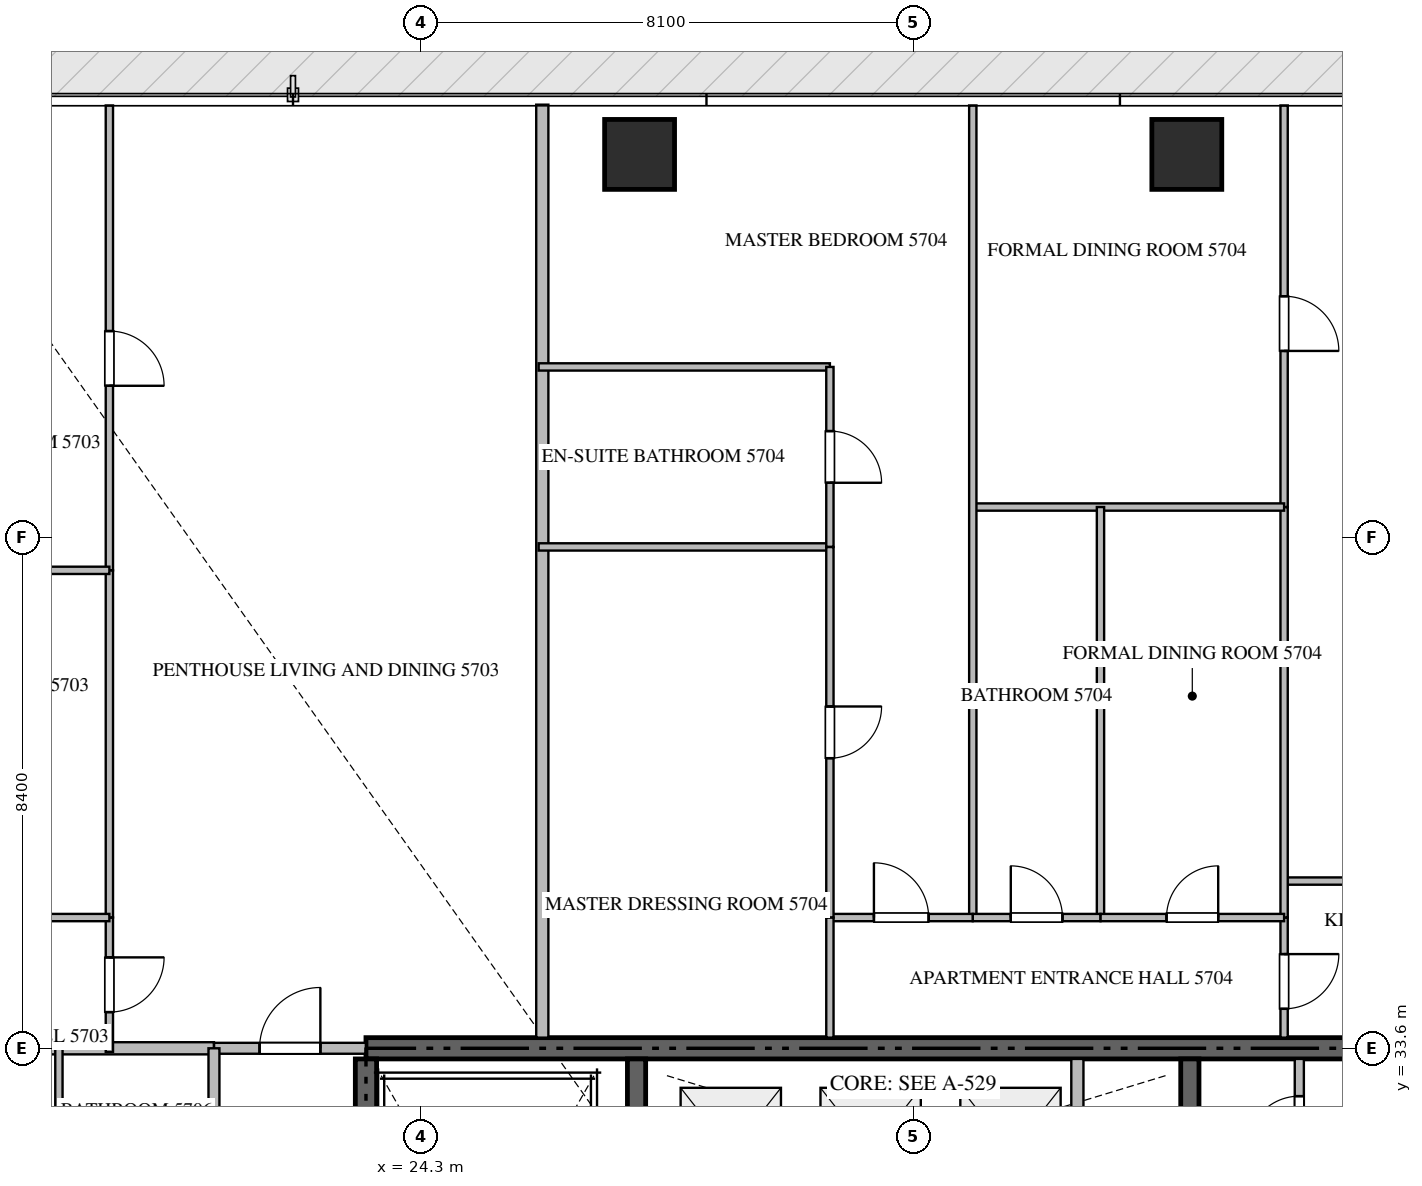
"""IFC4 building model, lengths in metres.
Left out: names, types, materials, properties, quantities, classifications, styles, units other than length and angle.
Written with IfcOpenShell. Run it as: python <this file> out.ifc"""

import sys

from ifc_helpers import new_model, si_unit, direction, frame, frame_2d, origin, origin_2d, place, context, subcontext, project, spatial, rectangle, extrude, source, transform, mapped, element, fill, save


model = new_model("IFC4")
c1 = context("Model", 3, precision=1e-05, world=origin(), true_north=direction((0.0, 1.0)))
c2 = subcontext(c1, "Body", "Model", "MODEL_VIEW")
j1 = project(units=[si_unit("LENGTHUNIT", "METRE"), si_unit("PLANEANGLEUNIT", "RADIAN")], contexts=[c1])
p1 = place(None, origin())
s1 = spatial("IfcSite", under=j1, at=p1, CompositionType="ELEMENT")
p2 = place(p1, origin())
s2 = spatial("IfcBuilding", under=s1, at=p2, CompositionType="ELEMENT")
p3 = place(p2, frame((0.0, 0.0, 229.7)))
s3 = spatial("IfcBuildingStorey", under=s2, at=p3, CompositionType="ELEMENT", Elevation=229.7)
p4 = place(p3, frame((41.4, 33.6, -0.26), z_axis=(0.0, 0.0, 1.0), x_axis=(-1.0, 0.0, 0.0)))
e1 = element("IfcWall", 1, at=p4, inside=s3, PredefinedType="SHEAR", context=c2, shape_type="SweptSolid", body=[
    extrude(rectangle(XDim=18.0, YDim=0.35, at=frame_2d((9.0, 0.0))), origin(), (0.0, 0.0, 1.0), 3.848),
])
p5 = place(p3, frame((23.4, 24.25, -0.26), z_axis=(0.0, 0.0, 1.0), x_axis=(0.0, 1.0, 0.0)))
e2 = element("IfcWall", 2, at=p5, inside=s3, PredefinedType="SHEAR", context=c2, shape_type="SweptSolid", body=[
    extrude(rectangle(XDim=9.175, YDim=0.35, at=frame_2d((4.587, 0.0))), origin(), (0.0, 0.0, 1.0), 3.848),
])
p6 = place(p3, frame((27.85, 23.55, -0.26), z_axis=(0.0, 0.0, 1.0), x_axis=(0.0, 1.0, 0.0)))
e3 = element("IfcWall", 3, at=p6, inside=s3, PredefinedType="SHEAR", context=c2, shape_type="SweptSolid", body=[
    extrude(rectangle(XDim=9.875, YDim=0.3, at=frame_2d((4.938, 0.0))), origin(), (0.0, 0.0, 1.0), 3.848),
])
p7 = place(p3, frame((36.95, 27.05, -0.26), z_axis=(0.0, 0.0, 1.0), x_axis=(0.0, 1.0, 0.0)))
e4 = element("IfcWall", 4, at=p7, inside=s3, PredefinedType="SHEAR", context=c2, shape_type="SweptSolid", body=[
    extrude(rectangle(XDim=6.375, YDim=0.3, at=frame_2d((3.188, 0.0))), origin(), (0.0, 0.0, 1.0), 3.848),
])
m1 = source(origin(), c2, "Body", "SweptSolid", [
    extrude(rectangle(XDim=1.15, YDim=1.15, at=origin_2d()), origin(), (0.0, 0.0, 1.0), 3.85),
])
for number, where, z_axis, x_axis in (
    (5, (27.9, 48.3, -0.26), (0.0, 0.0, 1.0), (1.0, 0.0, 0.0)),
    (6, (36.9, 48.3, -0.26), (0.0, 0.0, 1.0), (1.0, 0.0, 0.0)),
):
    element("IfcColumn", number, at=place(p3, frame(where, z_axis=z_axis, x_axis=x_axis)), inside=s3, PredefinedType="COLUMN", context=c2, shape_type="MappedRepresentation", body=[
        mapped(m1, transform((0.0, 0.0, 0.0), scale=1.0)),
    ])
p8 = place(p3, frame((35.1, 30.75, 0.0), z_axis=(0.0, 0.0, 1.0), x_axis=(0.0, 1.0, 0.0)))
e7 = element("IfcWall", 7, at=p8, inside=s3, PredefinedType="STANDARD", context=c2, shape_type="SweptSolid", body=[
    extrude(rectangle(XDim=2.675, YDim=0.2, at=frame_2d((1.337, 0.0))), origin(), (0.0, 0.0, 1.0), 3.59),
])
p9 = place(p3, frame((38.75, 31.352, 0.0), z_axis=(0.0, 0.0, 1.0), x_axis=(0.0, 1.0, 0.0)))
e8 = element("IfcWall", 8, at=p9, inside=s3, PredefinedType="PARTITIONING", context=c2, shape_type="SweptSolid", body=[
    extrude(rectangle(XDim=2.073, YDim=0.15, at=frame_2d((1.037, 0.0))), origin(), (0.0, 0.0, 1.0), 3.59),
])
p10 = place(p9, frame((0.611, 0.0, 0.0)))
e9 = element("IfcOpeningElement", 9, at=p10, cuts=e8, PredefinedType="OPENING", context=c2, shape_type="SweptSolid", body=[
    extrude(rectangle(XDim=0.85, YDim=2.1, at=frame_2d((0.425, 1.05))), frame((0.0, 0.085, 0.0), z_axis=(0.0, -1.0, 0.0), x_axis=(1.0, 0.0, 0.0)), (0.0, 0.0, 1.0), 0.17),
])
p11 = place(p3, frame((26.3, 33.775, 0.0), z_axis=(0.0, 0.0, 1.0), x_axis=(0.0, 1.0, 0.0)))
e10 = element("IfcWall", 10, at=p11, inside=s3, PredefinedType="PARTITIONING", context=c2, shape_type="SweptSolid", body=[
    extrude(rectangle(XDim=15.343, YDim=0.2, at=frame_2d((7.671, 0.0))), origin(), (0.0, 0.0, 1.0), 3.59),
])
p12 = place(p3, frame((7.482, 33.6, 0.0), z_axis=(0.0, 0.0, 1.0), x_axis=(1.0, 0.0, 0.0)))
e11 = element("IfcWall", 11, at=p12, inside=s3, PredefinedType="PARTITIONING", context=c2, shape_type="SweptSolid", body=[
    extrude(rectangle(XDim=13.418, YDim=0.2, at=frame_2d((6.709, 0.0))), origin(), (0.0, 0.0, 1.0), 3.59),
])
p13 = place(p3, frame((20.902, 33.6, 0.0), z_axis=(0.0, 0.0, 1.0), x_axis=(1.0, 0.0, 0.0)))
e12 = element("IfcWall", 12, at=p13, inside=s3, PredefinedType="PARTITIONING", context=c2, shape_type="SweptSolid", body=[
    extrude(rectangle(XDim=2.496, YDim=0.18, at=frame_2d((1.248, 0.0))), origin(), (0.0, 0.0, 1.0), 3.59),
])
p14 = place(p13, frame((0.748, 0.0, 0.0)))
e13 = element("IfcOpeningElement", 13, at=p14, cuts=e12, PredefinedType="OPENING", context=c2, shape_type="SweptSolid", body=[
    extrude(rectangle(XDim=1.0, YDim=2.15, at=frame_2d((0.5, 1.075))), frame((0.0, 0.1, 0.0), z_axis=(0.0, -1.0, 0.0), x_axis=(1.0, 0.0, 0.0)), (0.0, 0.0, 1.0), 0.2),
])
p15 = place(p3, frame((20.9, 16.8, 0.0), z_axis=(0.0, 0.0, 1.0), x_axis=(0.0, 1.0, 0.0)))
e14 = element("IfcWall", 14, at=p15, inside=s3, PredefinedType="PARTITIONING", context=c2, shape_type="SweptSolid", body=[
    extrude(rectangle(XDim=16.8, YDim=0.18, at=frame_2d((8.4, 0.0))), origin(), (0.0, 0.0, 1.0), 3.59),
])
p16 = place(p15, frame((2.465, 0.0, 0.0)))
e15 = element("IfcOpeningElement", 15, at=p16, cuts=e14, PredefinedType="OPENING", context=c2, shape_type="SweptSolid", body=[
    extrude(rectangle(XDim=1.0, YDim=2.15, at=frame_2d((0.5, 1.075))), frame((0.0, 0.1, 0.0), z_axis=(0.0, -1.0, 0.0), x_axis=(1.0, 0.0, 0.0)), (0.0, 0.0, 1.0), 0.2),
])
p17 = place(p15, frame((10.902, 0.0, 0.0)))
e16 = element("IfcOpeningElement", 16, at=p17, cuts=e14, PredefinedType="OPENING", context=c2, shape_type="SweptSolid", body=[
    extrude(rectangle(XDim=1.0, YDim=2.15, at=frame_2d((0.5, 1.075))), frame((0.0, 0.1, 0.0), z_axis=(0.0, -1.0, 0.0), x_axis=(1.0, 0.0, 0.0)), (0.0, 0.0, 1.0), 0.2),
])
p18 = place(p3, frame((19.18, 35.75, 0.0), z_axis=(0.0, 0.0, 1.0), x_axis=(0.0, -1.0, 0.0)))
e17 = element("IfcWall", 17, at=p18, inside=s3, PredefinedType="PARTITIONING", context=c2, shape_type="SweptSolid", body=[
    extrude(rectangle(XDim=2.21, YDim=0.12, at=frame_2d((1.105, 0.0))), origin(), (0.0, 0.0, 1.0), 3.59),
])
p19 = place(p18, frame((0.655, 0.0, 0.0)))
e18 = element("IfcOpeningElement", 18, at=p19, cuts=e17, PredefinedType="OPENING", context=c2, shape_type="SweptSolid", body=[
    extrude(rectangle(XDim=0.9, YDim=2.1, at=frame_2d((0.45, 1.05))), frame((0.0, 0.07, 0.0), z_axis=(0.0, -1.0, 0.0), x_axis=(1.0, 0.0, 0.0)), (0.0, 0.0, 1.0), 0.14),
])
p20 = place(p3, frame((19.18, 49.105, 0.0), z_axis=(0.0, 0.0, 1.0), x_axis=(0.0, -1.0, 0.0)))
e19 = element("IfcWall", 19, at=p20, inside=s3, PredefinedType="PARTITIONING", context=c2, shape_type="SweptSolid", body=[
    extrude(rectangle(XDim=7.645, YDim=0.12, at=frame_2d((3.823, 0.0))), origin(), (0.0, 0.0, 1.0), 3.59),
])
p21 = place(p20, frame((3.71, 0.0, 0.0)))
e20 = element("IfcOpeningElement", 20, at=p21, cuts=e19, PredefinedType="OPENING", context=c2, shape_type="SweptSolid", body=[
    extrude(rectangle(XDim=0.9, YDim=2.1, at=frame_2d((0.45, 1.05))), frame((0.0, 0.07, 0.0), z_axis=(0.0, -1.0, 0.0), x_axis=(1.0, 0.0, 0.0)), (0.0, 0.0, 1.0), 0.14),
])
p22 = place(p3, frame((19.18, 41.458, 0.0), z_axis=(0.0, 0.0, 1.0), x_axis=(0.0, -1.0, 0.0)))
e21 = element("IfcWall", 21, at=p22, inside=s3, PredefinedType="PARTITIONING", context=c2, shape_type="SweptSolid", body=[
    extrude(rectangle(XDim=5.706, YDim=0.12, at=frame_2d((2.853, 0.0))), origin(), (0.0, 0.0, 1.0), 3.59),
])
p23 = place(p3, frame((14.3, 41.46, 0.0), z_axis=(0.0, 0.0, 1.0), x_axis=(1.0, 0.0, 0.0)))
e22 = element("IfcWall", 22, at=p23, inside=s3, PredefinedType="PARTITIONING", context=c2, shape_type="SweptSolid", body=[
    extrude(rectangle(XDim=4.88, YDim=0.12, at=frame_2d((2.44, 0.0))), origin(), (0.0, 0.0, 1.0), 3.59),
])
p24 = place(p3, frame((16.402, 35.75, 0.0), z_axis=(0.0, 0.0, 1.0), x_axis=(1.0, 0.0, 0.0)))
e23 = element("IfcWall", 23, at=p24, inside=s3, PredefinedType="PARTITIONING", context=c2, shape_type="SweptSolid", body=[
    extrude(rectangle(XDim=2.778, YDim=0.12, at=frame_2d((1.389, 0.0))), origin(), (0.0, 0.0, 1.0), 3.59),
])
p25 = place(p24, frame((0.964, 0.0, 0.0)))
e24 = element("IfcOpeningElement", 24, at=p25, cuts=e23, PredefinedType="OPENING", context=c2, shape_type="SweptSolid", body=[
    extrude(rectangle(XDim=0.85, YDim=2.1, at=frame_2d((0.425, 1.05))), frame((0.0, 0.07, 0.0), z_axis=(0.0, -1.0, 0.0), x_axis=(1.0, 0.0, 0.0)), (0.0, 0.0, 1.0), 0.14),
])
p26 = place(p3, frame((38.5, 36.35, 0.0), z_axis=(0.0, 0.0, 1.0), x_axis=(1.0, 0.0, 0.0)))
e25 = element("IfcWall", 25, at=p26, inside=s3, PredefinedType="PARTITIONING", context=c2, shape_type="SweptSolid", body=[
    extrude(rectangle(XDim=2.85, YDim=0.12, at=frame_2d((1.425, 0.0))), origin(), (0.0, 0.0, 1.0), 3.59),
])
p27 = place(p26, frame((1.0, 0.0, 0.0)))
e26 = element("IfcOpeningElement", 26, at=p27, cuts=e25, PredefinedType="OPENING", context=c2, shape_type="SweptSolid", body=[
    extrude(rectangle(XDim=0.85, YDim=2.1, at=frame_2d((0.425, 1.05))), frame((0.0, 0.07, 0.0), z_axis=(0.0, -1.0, 0.0), x_axis=(1.0, 0.0, 0.0)), (0.0, 0.0, 1.0), 0.14),
])
p28 = place(p3, frame((38.5, 35.75, 0.0), z_axis=(0.0, 0.0, 1.0), x_axis=(0.0, -1.0, 0.0)))
e27 = element("IfcWall", 27, at=p28, inside=s3, PredefinedType="PARTITIONING", context=c2, shape_type="SweptSolid", body=[
    extrude(rectangle(XDim=1.975, YDim=0.12, at=frame_2d((0.988, 0.0))), origin(), (0.0, 0.0, 1.0), 3.59),
])
p29 = place(p28, frame((0.601, 0.0, 0.0)))
e28 = element("IfcOpeningElement", 28, at=p29, cuts=e27, PredefinedType="OPENING", context=c2, shape_type="SweptSolid", body=[
    extrude(rectangle(XDim=0.9, YDim=2.1, at=frame_2d((0.45, 1.05))), frame((0.0, 0.07, 0.0), z_axis=(0.0, -1.0, 0.0), x_axis=(1.0, 0.0, 0.0)), (0.0, 0.0, 1.0), 0.14),
])
p30 = place(p3, frame((38.5, 49.105, 0.0), z_axis=(0.0, 0.0, 1.0), x_axis=(0.0, -1.0, 0.0)))
e29 = element("IfcWall", 29, at=p30, inside=s3, PredefinedType="PARTITIONING", context=c2, shape_type="SweptSolid", body=[
    extrude(rectangle(XDim=6.604, YDim=0.12, at=frame_2d((3.302, 0.0))), origin(), (0.0, 0.0, 1.0), 3.59),
])
p31 = place(p30, frame((3.137, 0.0, 0.0)))
e30 = element("IfcOpeningElement", 30, at=p31, cuts=e29, PredefinedType="OPENING", context=c2, shape_type="SweptSolid", body=[
    extrude(rectangle(XDim=0.9, YDim=2.1, at=frame_2d((0.45, 1.05))), frame((0.0, 0.07, 0.0), z_axis=(0.0, -1.0, 0.0), x_axis=(1.0, 0.0, 0.0)), (0.0, 0.0, 1.0), 0.14),
])
p32 = place(p3, frame((38.5, 42.499, 0.0), z_axis=(0.0, 0.0, 1.0), x_axis=(0.0, -1.0, 0.0)))
e31 = element("IfcWall", 31, at=p32, inside=s3, PredefinedType="PARTITIONING", context=c2, shape_type="SweptSolid", body=[
    extrude(rectangle(XDim=6.747, YDim=0.12, at=frame_2d((3.374, 0.0))), origin(), (0.0, 0.0, 1.0), 3.59),
])
p33 = place(p3, frame((33.38, 42.501, 0.0), z_axis=(0.0, 0.0, 1.0), x_axis=(1.0, 0.0, 0.0)))
e32 = element("IfcWall", 32, at=p33, inside=s3, PredefinedType="PARTITIONING", context=c2, shape_type="SweptSolid", body=[
    extrude(rectangle(XDim=5.12, YDim=0.12, at=frame_2d((2.56, 0.0))), origin(), (0.0, 0.0, 1.0), 3.59),
])
p34 = place(p3, frame((33.38, 49.105, 0.0), z_axis=(0.0, 0.0, 1.0), x_axis=(0.0, -1.0, 0.0)))
e33 = element("IfcWall", 33, at=p34, inside=s3, PredefinedType="PARTITIONING", context=c2, shape_type="SweptSolid", body=[
    extrude(rectangle(XDim=13.355, YDim=0.12, at=frame_2d((6.677, 0.0))), origin(), (0.0, 0.0, 1.0), 3.59),
])
p35 = place(p3, frame((35.48, 42.501, 0.0), z_axis=(0.0, 0.0, 1.0), x_axis=(0.0, -1.0, 0.0)))
e34 = element("IfcWall", 34, at=p35, inside=s3, PredefinedType="PARTITIONING", context=c2, shape_type="SweptSolid", body=[
    extrude(rectangle(XDim=6.751, YDim=0.12, at=frame_2d((3.375, 0.0))), origin(), (0.0, 0.0, 1.0), 3.59),
])
p36 = place(p3, frame((33.38, 35.75, 0.0), z_axis=(0.0, 0.0, 1.0), x_axis=(1.0, 0.0, 0.0)))
e35 = element("IfcWall", 35, at=p36, inside=s3, PredefinedType="PARTITIONING", context=c2, shape_type="SweptSolid", body=[
    extrude(rectangle(XDim=2.1, YDim=0.12, at=frame_2d((1.05, 0.0))), origin(), (0.0, 0.0, 1.0), 3.59),
])
p37 = place(p36, frame((0.625, 0.0, 0.0)))
e36 = element("IfcOpeningElement", 36, at=p37, cuts=e35, PredefinedType="OPENING", context=c2, shape_type="SweptSolid", body=[
    extrude(rectangle(XDim=0.85, YDim=2.1, at=frame_2d((0.425, 1.05))), frame((0.0, 0.07, 0.0), z_axis=(0.0, -1.0, 0.0), x_axis=(1.0, 0.0, 0.0)), (0.0, 0.0, 1.0), 0.14),
])
p38 = place(p3, frame((35.482, 35.75, 0.0), z_axis=(0.0, 0.0, 1.0), x_axis=(1.0, 0.0, 0.0)))
e37 = element("IfcWall", 37, at=p38, inside=s3, PredefinedType="PARTITIONING", context=c2, shape_type="SweptSolid", body=[
    extrude(rectangle(XDim=3.018, YDim=0.12, at=frame_2d((1.509, 0.0))), origin(), (0.0, 0.0, 1.0), 3.59),
])
p39 = place(p38, frame((1.084, 0.0, 0.0)))
e38 = element("IfcOpeningElement", 38, at=p39, cuts=e37, PredefinedType="OPENING", context=c2, shape_type="SweptSolid", body=[
    extrude(rectangle(XDim=0.85, YDim=2.1, at=frame_2d((0.425, 1.05))), frame((0.0, 0.07, 0.0), z_axis=(0.0, -1.0, 0.0), x_axis=(1.0, 0.0, 0.0)), (0.0, 0.0, 1.0), 0.14),
])
p40 = place(p3, frame((31.03, 35.75, 0.0), z_axis=(0.0, 0.0, 1.0), x_axis=(1.0, 0.0, 0.0)))
e39 = element("IfcWall", 39, at=p40, inside=s3, PredefinedType="PARTITIONING", context=c2, shape_type="SweptSolid", body=[
    extrude(rectangle(XDim=2.348, YDim=0.12, at=frame_2d((1.174, 0.0))), origin(), (0.0, 0.0, 1.0), 3.59),
])
p41 = place(p40, frame((0.724, 0.0, 0.0)))
e40 = element("IfcOpeningElement", 40, at=p41, cuts=e39, PredefinedType="OPENING", context=c2, shape_type="SweptSolid", body=[
    extrude(rectangle(XDim=0.9, YDim=2.1, at=frame_2d((0.45, 1.05))), frame((0.0, 0.07, 0.0), z_axis=(0.0, -1.0, 0.0), x_axis=(1.0, 0.0, 0.0)), (0.0, 0.0, 1.0), 0.14),
])
for number, where, z_axis, x_axis in (
    (41, (26.24, 44.805, 0.0), (0.0, 0.0, 1.0), (1.0, 0.0, 0.0)),
    (42, (26.24, 41.845, 0.0), (0.0, 0.0, 1.0), (1.0, 0.0, 0.0)),
):
    element("IfcWall", number, at=place(p3, frame(where, z_axis=z_axis, x_axis=x_axis)), inside=s3, PredefinedType="PARTITIONING", context=c2, shape_type="SweptSolid", body=[
        extrude(rectangle(XDim=4.79, YDim=0.12, at=frame_2d((2.395, 0.0))), origin(), (0.0, 0.0, 1.0), 3.59),
    ])
p42 = place(p3, frame((31.03, 44.805, 0.0), z_axis=(0.0, 0.0, 1.0), x_axis=(0.0, -1.0, 0.0)))
e43 = element("IfcWall", 43, at=p42, inside=s3, PredefinedType="PARTITIONING", context=c2, shape_type="SweptSolid", body=[
    extrude(rectangle(XDim=2.96, YDim=0.12, at=frame_2d((1.48, 0.0))), origin(), (0.0, 0.0, 1.0), 3.59),
])
p43 = place(p42, frame((1.055, 0.0, 0.0)))
e44 = element("IfcOpeningElement", 44, at=p43, cuts=e43, PredefinedType="OPENING", context=c2, shape_type="SweptSolid", body=[
    extrude(rectangle(XDim=0.85, YDim=2.1, at=frame_2d((0.425, 1.05))), frame((0.0, 0.07, 0.0), z_axis=(0.0, -1.0, 0.0), x_axis=(1.0, 0.0, 0.0)), (0.0, 0.0, 1.0), 0.14),
])
p44 = place(p3, frame((31.03, 41.843, 0.0), z_axis=(0.0, 0.0, 1.0), x_axis=(0.0, -1.0, 0.0)))
e45 = element("IfcWall", 45, at=p44, inside=s3, PredefinedType="PARTITIONING", context=c2, shape_type="SweptSolid", body=[
    extrude(rectangle(XDim=6.093, YDim=0.12, at=frame_2d((3.046, 0.0))), origin(), (0.0, 0.0, 1.0), 3.59),
])
p45 = place(p44, frame((2.622, 0.0, 0.0)))
e46 = element("IfcOpeningElement", 46, at=p45, cuts=e45, PredefinedType="OPENING", context=c2, shape_type="SweptSolid", body=[
    extrude(rectangle(XDim=0.85, YDim=2.1, at=frame_2d((0.425, 1.05))), frame((0.0, 0.07, 0.0), z_axis=(0.0, -1.0, 0.0), x_axis=(1.0, 0.0, 0.0)), (0.0, 0.0, 1.0), 0.14),
])
p46 = place(p3, frame((31.03, 35.748, 0.0), z_axis=(0.0, 0.0, 1.0), x_axis=(0.0, -1.0, 0.0)))
e47 = element("IfcWall", 47, at=p46, inside=s3, PredefinedType="PARTITIONING", context=c2, shape_type="SweptSolid", body=[
    extrude(rectangle(XDim=1.973, YDim=0.12, at=frame_2d((0.987, 0.0))), origin(), (0.0, 0.0, 1.0), 3.59),
])
p47 = place(p3, frame((18.35, 31.0, 0.0), z_axis=(0.0, 0.0, 1.0), x_axis=(0.0, 1.0, 0.0)))
e48 = element("IfcWall", 48, at=p47, inside=s3, PredefinedType="PARTITIONING", context=c2, shape_type="SweptSolid", body=[
    extrude(rectangle(XDim=2.66, YDim=0.12, at=frame_2d((1.33, 0.0))), origin(), (0.0, 0.0, 1.0), 3.59),
])
m2 = source(origin(), c2, "Body", "SweptSolid", [
    extrude(rectangle(XDim=0.85, YDim=2.1, at=frame_2d((0.425, 1.05))), frame((0.0, 0.025, 0.0), z_axis=(0.0, -1.0, 0.0), x_axis=(1.0, 0.0, 0.0)), (0.0, 0.0, 1.0), 0.05),
])
p48 = place(p10, origin())
e49 = element("IfcDoor", 49, at=p48, inside=s3, OperationType="SINGLE_SWING_LEFT", PredefinedType="DOOR", context=c2, shape_type="MappedRepresentation", body=[
    mapped(m2, transform((0.0, 0.0, 0.0), scale=1.0)),
])
fill(e9, e49)
m3 = source(origin(), c2, "Body", "SweptSolid", [
    extrude(rectangle(XDim=1.0, YDim=2.15, at=frame_2d((0.5, 1.075))), frame((0.0, 0.025, 0.0), z_axis=(0.0, -1.0, 0.0), x_axis=(1.0, 0.0, 0.0)), (0.0, 0.0, 1.0), 0.05),
])
p49 = place(p14, origin())
e50 = element("IfcDoor", 50, at=p49, inside=s3, OperationType="SINGLE_SWING_RIGHT", PredefinedType="DOOR", context=c2, shape_type="MappedRepresentation", body=[
    mapped(m3, transform((0.0, 0.0, 0.0), scale=1.0)),
])
fill(e13, e50)
m4 = source(origin(), c2, "Body", "SweptSolid", [
    extrude(rectangle(XDim=0.9, YDim=2.1, at=frame_2d((0.45, 1.05))), frame((0.0, 0.025, 0.0), z_axis=(0.0, -1.0, 0.0), x_axis=(1.0, 0.0, 0.0)), (0.0, 0.0, 1.0), 0.05),
])
p50 = place(p19, origin())
e51 = element("IfcDoor", 51, at=p50, inside=s3, OperationType="SINGLE_SWING_LEFT", PredefinedType="DOOR", context=c2, shape_type="MappedRepresentation", body=[
    mapped(m4, transform((0.0, 0.0, 0.0), scale=1.0)),
])
fill(e18, e51)
p51 = place(p21, origin())
e52 = element("IfcDoor", 52, at=p51, inside=s3, OperationType="SINGLE_SWING_RIGHT", PredefinedType="DOOR", context=c2, shape_type="MappedRepresentation", body=[
    mapped(m4, transform((0.0, 0.0, 0.0), scale=1.0)),
])
fill(e20, e52)
p52 = place(p29, origin())
e53 = element("IfcDoor", 53, at=p52, inside=s3, OperationType="SINGLE_SWING_LEFT", PredefinedType="DOOR", context=c2, shape_type="MappedRepresentation", body=[
    mapped(m4, transform((0.0, 0.0, 0.0), scale=1.0)),
])
fill(e28, e53)
p53 = place(p31, origin())
e54 = element("IfcDoor", 54, at=p53, inside=s3, OperationType="SINGLE_SWING_RIGHT", PredefinedType="DOOR", context=c2, shape_type="MappedRepresentation", body=[
    mapped(m4, transform((0.0, 0.0, 0.0), scale=1.0)),
])
fill(e30, e54)
p54 = place(p37, origin())
e55 = element("IfcDoor", 55, at=p54, inside=s3, OperationType="SINGLE_SWING_LEFT", PredefinedType="DOOR", context=c2, shape_type="MappedRepresentation", body=[
    mapped(m2, transform((0.0, 0.0, 0.0), scale=1.0)),
])
fill(e36, e55)
p55 = place(p39, origin())
e56 = element("IfcDoor", 56, at=p55, inside=s3, OperationType="SINGLE_SWING_RIGHT", PredefinedType="DOOR", context=c2, shape_type="MappedRepresentation", body=[
    mapped(m2, transform((0.0, 0.0, 0.0), scale=1.0)),
])
fill(e38, e56)
p56 = place(p41, origin())
e57 = element("IfcDoor", 57, at=p56, inside=s3, OperationType="SINGLE_SWING_LEFT", PredefinedType="DOOR", context=c2, shape_type="MappedRepresentation", body=[
    mapped(m4, transform((0.0, 0.0, 0.0), scale=1.0)),
])
fill(e40, e57)
p57 = place(p43, origin())
e58 = element("IfcDoor", 58, at=p57, inside=s3, OperationType="SINGLE_SWING_RIGHT", PredefinedType="DOOR", context=c2, shape_type="MappedRepresentation", body=[
    mapped(m2, transform((0.0, 0.0, 0.0), scale=1.0)),
])
fill(e44, e58)
p58 = place(p45, origin())
e59 = element("IfcDoor", 59, at=p58, inside=s3, OperationType="SINGLE_SWING_LEFT", PredefinedType="DOOR", context=c2, shape_type="MappedRepresentation", body=[
    mapped(m2, transform((0.0, 0.0, 0.0), scale=1.0)),
])
fill(e46, e59)
save(model, sys.argv[1])
